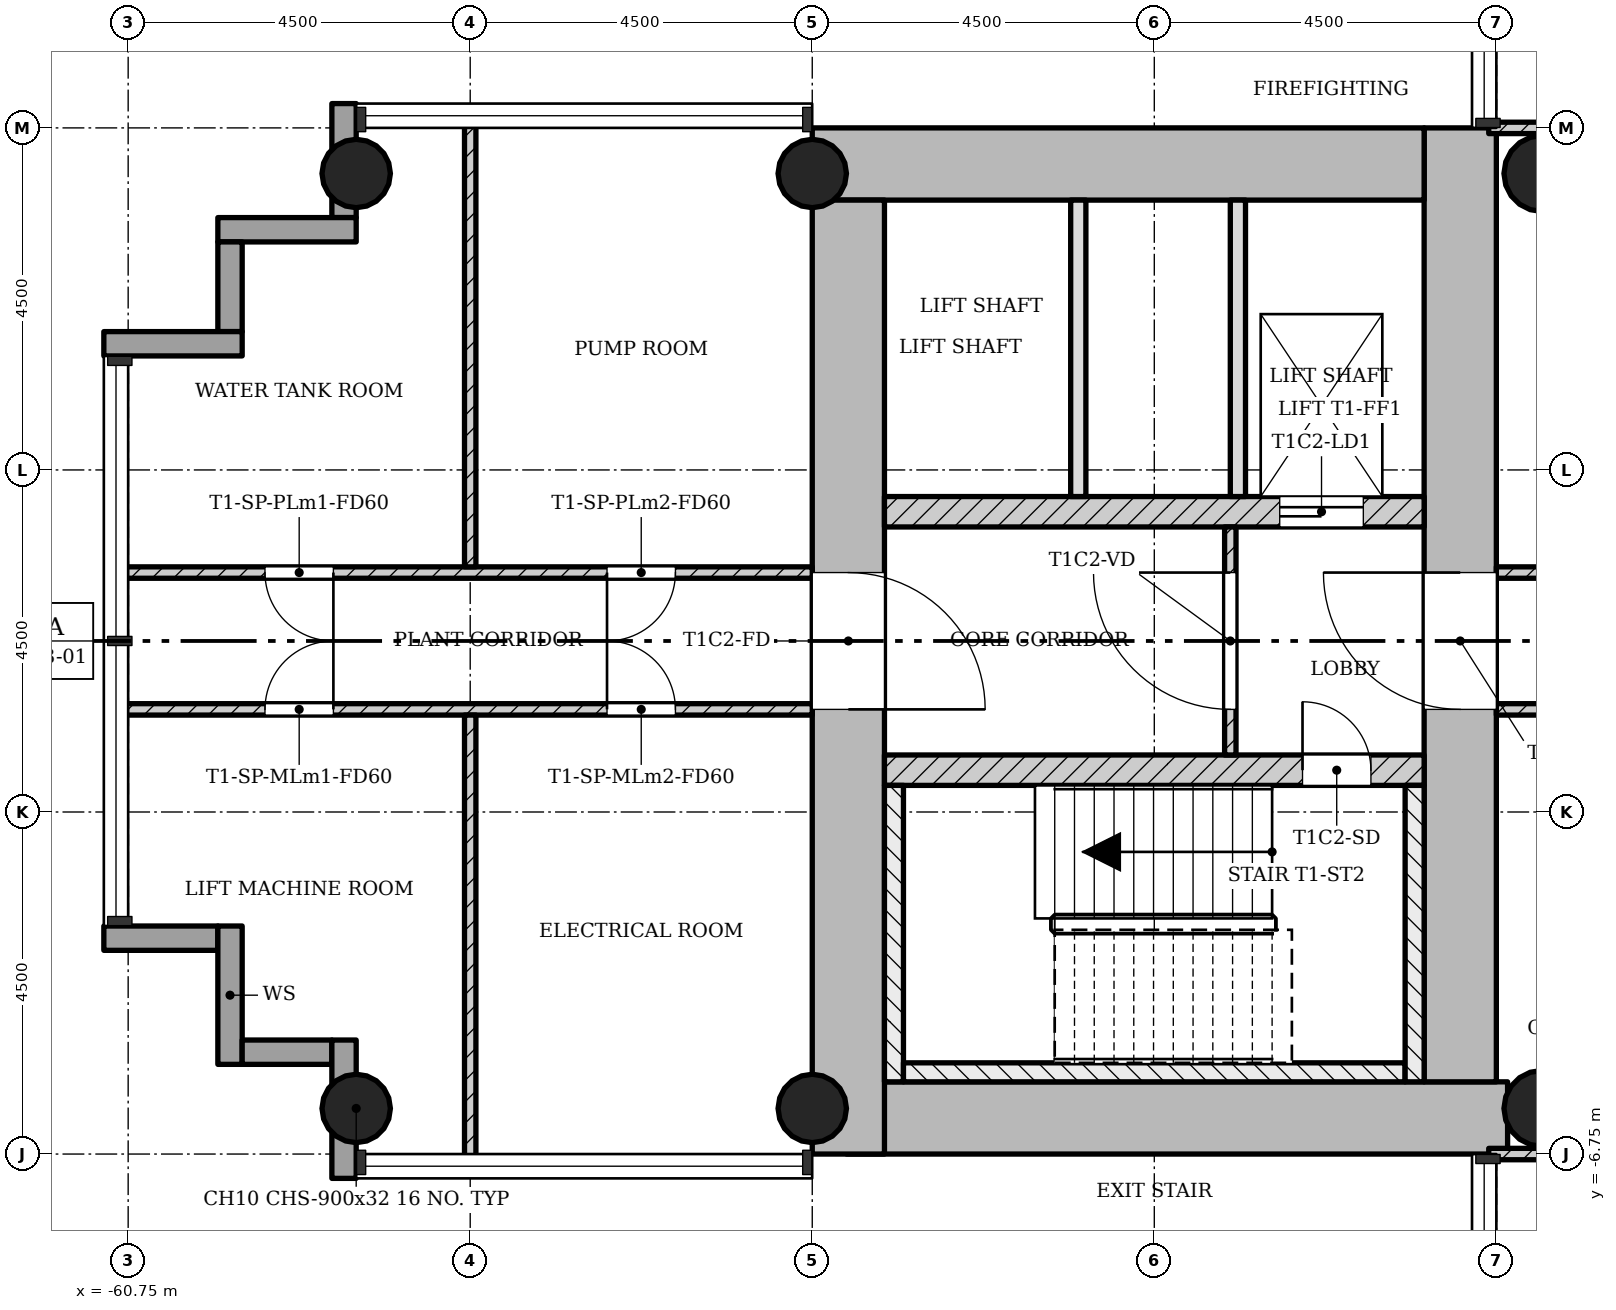
"""IFC4 building model, lengths in metres.
Left out: names, types, materials, properties, quantities, classifications, styles, units other than length and angle.
Written with IfcOpenShell. Run it as: python <this file> out.ifc"""

import sys

from ifc_helpers import new_model, si_unit, direction, frame, frame_2d, origin, origin_2d, place, context, subcontext, project, spatial, rectangle, hollow_circle, extrude, element, fill, save


model = new_model("IFC4")
c1 = context("Model", 3, precision=1e-05, world=origin(), true_north=direction((0.0, 1.0)))
c2 = subcontext(c1, "Body", "Model", "MODEL_VIEW")
j1 = project(units=[si_unit("LENGTHUNIT", "METRE"), si_unit("PLANEANGLEUNIT", "RADIAN")], contexts=[c1])
p1 = place(None, origin())
s1 = spatial("IfcSite", under=j1, at=p1, CompositionType="ELEMENT")
p2 = place(p1, origin())
s2 = spatial("IfcBuilding", under=s1, at=p2, CompositionType="ELEMENT")
p3 = place(p2, frame((0.0, 0.0, 124.2)))
s3 = spatial("IfcBuildingStorey", under=s2, at=p3, CompositionType="ELEMENT", Elevation=124.2)
p4 = place(p3, frame((-51.298, -6.275, 0.0), z_axis=(0.0, 0.0, 1.0), x_axis=(1.0, 0.0, 0.0)))
e1 = element("IfcWall", 1, at=p4, inside=s3, PredefinedType="SHEAR", context=c2, shape_type="SweptSolid", body=[
    extrude(rectangle(XDim=8.696, YDim=0.95, at=frame_2d((4.348, 0.0))), origin(), (0.0, 0.0, 1.0), 4.5),
])
p5 = place(p3, frame((-43.225, -5.8, 0.0), z_axis=(0.0, 0.0, 1.0), x_axis=(0.0, 1.0, 0.0)))
e2 = element("IfcWall", 2, at=p5, inside=s3, PredefinedType="SHEAR", context=c2, shape_type="SweptSolid", body=[
    extrude(rectangle(XDim=12.55, YDim=0.95, at=frame_2d((6.275, 0.0))), origin(), (0.0, 0.0, 1.0), 4.5),
])
p6 = place(p5, frame((4.9, 0.0, 0.0)))
e3 = element("IfcOpeningElement", 3, at=p6, cuts=e2, PredefinedType="OPENING", context=c2, shape_type="SweptSolid", body=[
    extrude(rectangle(XDim=1.8, YDim=2.1, at=frame_2d((0.9, 1.05))), frame((0.0, 0.485, 0.0), z_axis=(0.0, -1.0, 0.0), x_axis=(1.0, 0.0, 0.0)), (0.0, 0.0, 1.0), 0.97),
])
p7 = place(p3, frame((-43.7, 6.275, 0.0), z_axis=(0.0, 0.0, 1.0), x_axis=(-1.0, 0.0, 0.0)))
e4 = element("IfcWall", 4, at=p7, inside=s3, PredefinedType="SHEAR", context=c2, shape_type="SweptSolid", body=[
    extrude(rectangle(XDim=8.05, YDim=0.95, at=frame_2d((4.025, 0.0))), origin(), (0.0, 0.0, 1.0), 4.5),
])
p8 = place(p3, frame((-51.275, 5.8, 0.0), z_axis=(0.0, 0.0, 1.0), x_axis=(0.0, -1.0, 0.0)))
e5 = element("IfcWall", 5, at=p8, inside=s3, PredefinedType="SHEAR", context=c2, shape_type="SweptSolid", body=[
    extrude(rectangle(XDim=12.55, YDim=0.95, at=frame_2d((6.275, 0.0))), origin(), (0.0, 0.0, 1.0), 4.5),
])
p9 = place(p8, frame((4.9, 0.0, 0.0)))
e6 = element("IfcOpeningElement", 6, at=p9, cuts=e5, PredefinedType="OPENING", context=c2, shape_type="SweptSolid", body=[
    extrude(rectangle(XDim=1.8, YDim=2.1, at=frame_2d((0.9, 1.05))), frame((0.0, 0.485, 0.0), z_axis=(0.0, -1.0, 0.0), x_axis=(1.0, 0.0, 0.0)), (0.0, 0.0, 1.0), 0.97),
])
p10 = place(p3, frame((-50.8, -1.7, 0.0), z_axis=(0.0, 0.0, 1.0), x_axis=(1.0, 0.0, 0.0)))
e7 = element("IfcWall", 7, at=p10, inside=s3, PredefinedType="SHEAR", context=c2, shape_type="SweptSolid", body=[
    extrude(rectangle(XDim=7.1, YDim=0.4, at=frame_2d((3.55, 0.0))), origin(), (0.0, 0.0, 1.0), 4.5),
])
p11 = place(p10, frame((5.5, 0.0, 0.0)))
e8 = element("IfcOpeningElement", 8, at=p11, cuts=e7, PredefinedType="OPENING", context=c2, shape_type="SweptSolid", body=[
    extrude(rectangle(XDim=0.9, YDim=2.1, at=frame_2d((0.45, 1.05))), frame((0.0, 0.21, 0.0), z_axis=(0.0, -1.0, 0.0), x_axis=(1.0, 0.0, 0.0)), (0.0, 0.0, 1.0), 0.42),
])
p12 = place(p3, frame((-50.8, 1.7, 0.0), z_axis=(0.0, 0.0, 1.0), x_axis=(1.0, 0.0, 0.0)))
e9 = element("IfcWall", 9, at=p12, inside=s3, PredefinedType="SHEAR", context=c2, shape_type="SweptSolid", body=[
    extrude(rectangle(XDim=7.1, YDim=0.4, at=frame_2d((3.55, 0.0))), origin(), (0.0, 0.0, 1.0), 4.5),
])
p13 = place(p12, frame((5.2, 0.0, 0.0)))
e10 = element("IfcOpeningElement", 10, at=p13, cuts=e9, PredefinedType="OPENING", context=c2, shape_type="SweptSolid", body=[
    extrude(rectangle(XDim=1.1, YDim=2.1, at=frame_2d((0.55, 1.05))), frame((0.0, 0.21, 0.0), z_axis=(0.0, -1.0, 0.0), x_axis=(1.0, 0.0, 0.0)), (0.0, 0.0, 1.0), 0.42),
])
for number, where, z_axis, x_axis in (
    (11, (-51.75, -6.15, 0.0), (0.0, 0.0, 1.0), (1.0, 0.0, 0.0)),
    (12, (-51.75, 6.15, 0.0), (0.0, 0.0, 1.0), (1.0, 0.0, 0.0)),
    (13, (-57.75, -6.15, 0.0), (0.0, 0.0, 1.0), (1.0, 0.0, 0.0)),
    (14, (-57.75, 6.15, 0.0), (0.0, 0.0, 1.0), (1.0, 0.0, 0.0)),
):
    element("IfcColumn", number, at=place(p3, frame(where, z_axis=z_axis, x_axis=x_axis)), inside=s3, PredefinedType="COLUMN", context=c2, shape_type="SweptSolid", body=[
        extrude(hollow_circle(Radius=0.45, WallThickness=0.032, at=origin_2d()), origin(), (0.0, 0.0, 1.0), 4.5),
    ])
for number, where, z_axis, x_axis in (
    (15, (-42.15, -6.15, 0.0), (0.0, 0.0, 1.0), (1.0, 0.0, 0.0)),
    (16, (-42.15, 6.15, 0.0), (0.0, 0.0, 1.0), (1.0, 0.0, 0.0)),
):
    element("IfcColumn", number, at=place(p3, frame(where, z_axis=z_axis, x_axis=x_axis)), inside=s3, PredefinedType="COLUMN", context=c2, shape_type="SweptSolid", body=[
        extrude(hollow_circle(Radius=0.5, WallThickness=0.036, at=origin_2d()), origin(), (0.0, 0.0, 1.0), 4.5),
    ])
p14 = place(p3, frame((-61.07, -3.91, -0.3), z_axis=(0.0, 0.0, 1.0), x_axis=(1.0, 0.0, 0.0)))
e17 = element("IfcWall", 17, at=p14, inside=s3, PredefinedType="STANDARD", context=c2, shape_type="SweptSolid", body=[
    extrude(rectangle(XDim=1.5, YDim=0.32, at=frame_2d((0.75, 0.0))), origin(), (0.0, 0.0, 1.0), 4.5),
])
p15 = place(p3, frame((-59.41, -3.75, -0.3), z_axis=(0.0, 0.0, 1.0), x_axis=(0.0, -1.0, 0.0)))
e18 = element("IfcWall", 18, at=p15, inside=s3, PredefinedType="STANDARD", context=c2, shape_type="SweptSolid", body=[
    extrude(rectangle(XDim=1.82, YDim=0.32, at=frame_2d((0.91, 0.0))), origin(), (0.0, 0.0, 1.0), 4.5),
])
p16 = place(p3, frame((-59.25, -5.41, -0.3), z_axis=(0.0, 0.0, 1.0), x_axis=(1.0, 0.0, 0.0)))
e19 = element("IfcWall", 19, at=p16, inside=s3, PredefinedType="STANDARD", context=c2, shape_type="SweptSolid", body=[
    extrude(rectangle(XDim=1.18, YDim=0.32, at=frame_2d((0.59, 0.0))), origin(), (0.0, 0.0, 1.0), 4.5),
])
p17 = place(p3, frame((-57.91, -5.25, -0.3), z_axis=(0.0, 0.0, 1.0), x_axis=(0.0, -1.0, 0.0)))
e20 = element("IfcWall", 20, at=p17, inside=s3, PredefinedType="STANDARD", context=c2, shape_type="SweptSolid", body=[
    extrude(rectangle(XDim=1.82, YDim=0.32, at=frame_2d((0.91, 0.0))), origin(), (0.0, 0.0, 1.0), 4.5),
])
p18 = place(p3, frame((-57.91, 7.07, -0.3), z_axis=(0.0, 0.0, 1.0), x_axis=(0.0, -1.0, 0.0)))
e21 = element("IfcWall", 21, at=p18, inside=s3, PredefinedType="STANDARD", context=c2, shape_type="SweptSolid", body=[
    extrude(rectangle(XDim=1.5, YDim=0.32, at=frame_2d((0.75, 0.0))), origin(), (0.0, 0.0, 1.0), 4.5),
])
p19 = place(p3, frame((-57.75, 5.41, -0.3), z_axis=(0.0, 0.0, 1.0), x_axis=(-1.0, 0.0, 0.0)))
e22 = element("IfcWall", 22, at=p19, inside=s3, PredefinedType="STANDARD", context=c2, shape_type="SweptSolid", body=[
    extrude(rectangle(XDim=1.82, YDim=0.32, at=frame_2d((0.91, 0.0))), origin(), (0.0, 0.0, 1.0), 4.5),
])
p20 = place(p3, frame((-59.41, 5.25, -0.3), z_axis=(0.0, 0.0, 1.0), x_axis=(0.0, -1.0, 0.0)))
e23 = element("IfcWall", 23, at=p20, inside=s3, PredefinedType="STANDARD", context=c2, shape_type="SweptSolid", body=[
    extrude(rectangle(XDim=1.18, YDim=0.32, at=frame_2d((0.59, 0.0))), origin(), (0.0, 0.0, 1.0), 4.5),
])
p21 = place(p3, frame((-59.25, 3.91, -0.3), z_axis=(0.0, 0.0, 1.0), x_axis=(-1.0, 0.0, 0.0)))
e24 = element("IfcWall", 24, at=p21, inside=s3, PredefinedType="STANDARD", context=c2, shape_type="SweptSolid", body=[
    extrude(rectangle(XDim=1.82, YDim=0.32, at=frame_2d((0.91, 0.0))), origin(), (0.0, 0.0, 1.0), 4.5),
])
p22 = place(p3, frame((-46.25, 1.5, 0.0), z_axis=(0.0, 0.0, 1.0), x_axis=(0.0, -1.0, 0.0)))
e25 = element("IfcWall", 25, at=p22, inside=s3, PredefinedType="PARTITIONING", context=c2, shape_type="SweptSolid", body=[
    extrude(rectangle(XDim=3.0, YDim=0.15, at=frame_2d((1.5, 0.0))), origin(), (0.0, 0.0, 1.0), 4.1),
])
p23 = place(p22, frame((0.6, 0.0, 0.0)))
e26 = element("IfcOpeningElement", 26, at=p23, cuts=e25, PredefinedType="OPENING", context=c2, shape_type="SweptSolid", body=[
    extrude(rectangle(XDim=1.8, YDim=2.1, at=frame_2d((0.9, 1.05))), frame((0.0, 0.085, 0.0), z_axis=(0.0, -1.0, 0.0), x_axis=(1.0, 0.0, 0.0)), (0.0, 0.0, 1.0), 0.17),
])
for number, where, z_axis, x_axis in (
    (27, (-46.15, 5.8, 0.0), (0.0, 0.0, 1.0), (0.0, -1.0, 0.0)),
    (28, (-48.25, 5.8, 0.0), (0.0, 0.0, 1.0), (0.0, -1.0, 0.0)),
):
    element("IfcWall", number, at=place(p3, frame(where, z_axis=z_axis, x_axis=x_axis)), inside=s3, PredefinedType="SOLIDWALL", context=c2, shape_type="SweptSolid", body=[
        extrude(rectangle(XDim=3.9, YDim=0.2, at=frame_2d((1.95, 0.0))), origin(), (0.0, 0.0, 1.0), 4.1),
    ])
p24 = place(p3, frame((-42.75, 0.9, 0.0), z_axis=(0.0, 0.0, 1.0), x_axis=(1.0, 0.0, 0.0)))
e29 = element("IfcWall", 29, at=p24, inside=s3, PredefinedType="PARTITIONING", context=c2, shape_type="SweptSolid", body=[
    extrude(rectangle(XDim=5.85, YDim=0.15, at=frame_2d((2.925, 0.0))), origin(), (0.0, 0.0, 1.0), 4.1),
])
p25 = place(p24, frame((2.475, 0.0, 0.0)))
e30 = element("IfcOpeningElement", 30, at=p25, cuts=e29, PredefinedType="OPENING", context=c2, shape_type="SweptSolid", body=[
    extrude(rectangle(XDim=0.9, YDim=2.1, at=frame_2d((0.45, 1.05))), frame((0.0, 0.085, 0.0), z_axis=(0.0, -1.0, 0.0), x_axis=(1.0, 0.0, 0.0)), (0.0, 0.0, 1.0), 0.17),
])
p26 = place(p3, frame((-42.75, -0.9, 0.0), z_axis=(0.0, 0.0, 1.0), x_axis=(1.0, 0.0, 0.0)))
e31 = element("IfcWall", 31, at=p26, inside=s3, PredefinedType="PARTITIONING", context=c2, shape_type="SweptSolid", body=[
    extrude(rectangle(XDim=5.85, YDim=0.15, at=frame_2d((2.925, 0.0))), origin(), (0.0, 0.0, 1.0), 4.1),
])
p27 = place(p26, frame((2.475, 0.0, 0.0)))
e32 = element("IfcOpeningElement", 32, at=p27, cuts=e31, PredefinedType="OPENING", context=c2, shape_type="SweptSolid", body=[
    extrude(rectangle(XDim=0.9, YDim=2.1, at=frame_2d((0.45, 1.05))), frame((0.0, 0.085, 0.0), z_axis=(0.0, -1.0, 0.0), x_axis=(1.0, 0.0, 0.0)), (0.0, 0.0, 1.0), 0.17),
])
p28 = place(p3, frame((-60.85, 0.9, 0.0), z_axis=(0.0, 0.0, 1.0), x_axis=(1.0, 0.0, 0.0)))
e33 = element("IfcWall", 33, at=p28, inside=s3, PredefinedType="PARTITIONING", context=c2, shape_type="SweptSolid", body=[
    extrude(rectangle(XDim=9.1, YDim=0.15, at=frame_2d((4.55, 0.0))), origin(), (0.0, 0.0, 1.0), 4.1),
])
p29 = place(p28, frame((1.9, 0.0, 0.0)))
e34 = element("IfcOpeningElement", 34, at=p29, cuts=e33, PredefinedType="OPENING", context=c2, shape_type="SweptSolid", body=[
    extrude(rectangle(XDim=0.9, YDim=2.1, at=frame_2d((0.45, 1.05))), frame((0.0, 0.085, 0.0), z_axis=(0.0, -1.0, 0.0), x_axis=(1.0, 0.0, 0.0)), (0.0, 0.0, 1.0), 0.17),
])
p30 = place(p28, frame((6.4, 0.0, 0.0)))
e35 = element("IfcOpeningElement", 35, at=p30, cuts=e33, PredefinedType="OPENING", context=c2, shape_type="SweptSolid", body=[
    extrude(rectangle(XDim=0.9, YDim=2.1, at=frame_2d((0.45, 1.05))), frame((0.0, 0.085, 0.0), z_axis=(0.0, -1.0, 0.0), x_axis=(1.0, 0.0, 0.0)), (0.0, 0.0, 1.0), 0.17),
])
p31 = place(p3, frame((-56.25, 0.975, 0.0), z_axis=(0.0, 0.0, 1.0), x_axis=(0.0, 1.0, 0.0)))
e36 = element("IfcWall", 36, at=p31, inside=s3, PredefinedType="PARTITIONING", context=c2, shape_type="SweptSolid", body=[
    extrude(rectangle(XDim=5.875, YDim=0.15, at=frame_2d((2.938, 0.0))), origin(), (0.0, 0.0, 1.0), 4.1),
])
p32 = place(p3, frame((-60.85, -0.9, 0.0), z_axis=(0.0, 0.0, 1.0), x_axis=(1.0, 0.0, 0.0)))
e37 = element("IfcWall", 37, at=p32, inside=s3, PredefinedType="PARTITIONING", context=c2, shape_type="SweptSolid", body=[
    extrude(rectangle(XDim=9.1, YDim=0.15, at=frame_2d((4.55, 0.0))), origin(), (0.0, 0.0, 1.0), 4.1),
])
p33 = place(p32, frame((1.9, 0.0, 0.0)))
e38 = element("IfcOpeningElement", 38, at=p33, cuts=e37, PredefinedType="OPENING", context=c2, shape_type="SweptSolid", body=[
    extrude(rectangle(XDim=0.9, YDim=2.1, at=frame_2d((0.45, 1.05))), frame((0.0, 0.085, 0.0), z_axis=(0.0, -1.0, 0.0), x_axis=(1.0, 0.0, 0.0)), (0.0, 0.0, 1.0), 0.17),
])
p34 = place(p32, frame((6.4, 0.0, 0.0)))
e39 = element("IfcOpeningElement", 39, at=p34, cuts=e37, PredefinedType="OPENING", context=c2, shape_type="SweptSolid", body=[
    extrude(rectangle(XDim=0.9, YDim=2.1, at=frame_2d((0.45, 1.05))), frame((0.0, 0.085, 0.0), z_axis=(0.0, -1.0, 0.0), x_axis=(1.0, 0.0, 0.0)), (0.0, 0.0, 1.0), 0.17),
])
p35 = place(p3, frame((-56.25, -0.975, 0.0), z_axis=(0.0, 0.0, 1.0), x_axis=(0.0, -1.0, 0.0)))
e40 = element("IfcWall", 40, at=p35, inside=s3, PredefinedType="PARTITIONING", context=c2, shape_type="SweptSolid", body=[
    extrude(rectangle(XDim=5.875, YDim=0.15, at=frame_2d((2.938, 0.0))), origin(), (0.0, 0.0, 1.0), 4.1),
])
p36 = place(p3, frame((-42.85, 6.75, 0.0), z_axis=(0.0, 0.0, 1.0), x_axis=(1.0, 0.0, 0.0)))
e41 = element("IfcWall", 41, at=p36, inside=s3, PredefinedType="PARTITIONING", context=c2, shape_type="SweptSolid", body=[
    extrude(rectangle(XDim=13.7, YDim=0.15, at=frame_2d((6.85, 0.0))), origin(), (0.0, 0.0, 1.0), 4.1),
])
p37 = place(p36, frame((5.95, 0.0, 0.0)))
e42 = element("IfcOpeningElement", 42, at=p37, cuts=e41, PredefinedType="OPENING", context=c2, shape_type="SweptSolid", body=[
    extrude(rectangle(XDim=1.8, YDim=2.1, at=frame_2d((0.9, 1.05))), frame((0.0, 0.085, 0.0), z_axis=(0.0, -1.0, 0.0), x_axis=(1.0, 0.0, 0.0)), (0.0, 0.0, 1.0), 0.17),
])
p38 = place(p3, frame((-42.85, -6.75, 0.0), z_axis=(0.0, 0.0, 1.0), x_axis=(1.0, 0.0, 0.0)))
e43 = element("IfcWall", 43, at=p38, inside=s3, PredefinedType="PARTITIONING", context=c2, shape_type="SweptSolid", body=[
    extrude(rectangle(XDim=13.7, YDim=0.15, at=frame_2d((6.85, 0.0))), origin(), (0.0, 0.0, 1.0), 4.1),
])
p39 = place(p38, frame((5.95, 0.0, 0.0)))
e44 = element("IfcOpeningElement", 44, at=p39, cuts=e43, PredefinedType="OPENING", context=c2, shape_type="SweptSolid", body=[
    extrude(rectangle(XDim=1.8, YDim=2.1, at=frame_2d((0.9, 1.05))), frame((0.0, 0.085, 0.0), z_axis=(0.0, -1.0, 0.0), x_axis=(1.0, 0.0, 0.0)), (0.0, 0.0, 1.0), 0.17),
])
p40 = place(p3, frame((-50.675, -1.9, 0.0), z_axis=(0.0, 0.0, 1.0), x_axis=(0.0, -1.0, 0.0)))
e45 = element("IfcWall", 45, at=p40, inside=s3, PredefinedType="SHEAR", context=c2, shape_type="SweptSolid", body=[
    extrude(rectangle(XDim=3.9, YDim=0.25, at=frame_2d((1.95, 0.0))), origin(), (0.0, 0.0, 1.0), 4.5),
])
p41 = place(p3, frame((-43.95, -5.675, 0.0), z_axis=(0.0, 0.0, 1.0), x_axis=(-1.0, 0.0, 0.0)))
e46 = element("IfcWall", 46, at=p41, inside=s3, PredefinedType="SHEAR", context=c2, shape_type="SweptSolid", body=[
    extrude(rectangle(XDim=6.6, YDim=0.25, at=frame_2d((3.3, 0.0))), origin(), (0.0, 0.0, 1.0), 4.5),
])
p42 = place(p3, frame((-43.825, -1.9, 0.0), z_axis=(0.0, 0.0, 1.0), x_axis=(0.0, -1.0, 0.0)))
e47 = element("IfcWall", 47, at=p42, inside=s3, PredefinedType="SHEAR", context=c2, shape_type="SweptSolid", body=[
    extrude(rectangle(XDim=3.9, YDim=0.25, at=frame_2d((1.95, 0.0))), origin(), (0.0, 0.0, 1.0), 4.5),
])
p43 = place(p23, origin())
e48 = element("IfcDoor", 48, at=p43, inside=s3, OperationType="SINGLE_SWING_LEFT", PredefinedType="DOOR", context=c2, shape_type="SweptSolid", body=[
    extrude(rectangle(XDim=1.8, YDim=2.1, at=frame_2d((0.9, 1.05))), frame((0.0, 0.025, 0.0), z_axis=(0.0, -1.0, 0.0), x_axis=(1.0, 0.0, 0.0)), (0.0, 0.0, 1.0), 0.05),
])
fill(e26, e48)
p44 = place(p29, origin())
e49 = element("IfcDoor", 49, at=p44, inside=s3, OperationType="SINGLE_SWING_RIGHT", PredefinedType="DOOR", context=c2, shape_type="SweptSolid", body=[
    extrude(rectangle(XDim=0.9, YDim=2.1, at=frame_2d((0.45, 1.05))), frame((0.0, 0.025, 0.0), z_axis=(0.0, -1.0, 0.0), x_axis=(1.0, 0.0, 0.0)), (0.0, 0.0, 1.0), 0.05),
])
fill(e34, e49)
p45 = place(p30, origin())
e50 = element("IfcDoor", 50, at=p45, inside=s3, OperationType="SINGLE_SWING_LEFT", PredefinedType="DOOR", context=c2, shape_type="SweptSolid", body=[
    extrude(rectangle(XDim=0.9, YDim=2.1, at=frame_2d((0.45, 1.05))), frame((0.0, 0.025, 0.0), z_axis=(0.0, -1.0, 0.0), x_axis=(1.0, 0.0, 0.0)), (0.0, 0.0, 1.0), 0.05),
])
fill(e35, e50)
p46 = place(p33, origin())
e51 = element("IfcDoor", 51, at=p46, inside=s3, OperationType="SINGLE_SWING_LEFT", PredefinedType="DOOR", context=c2, shape_type="SweptSolid", body=[
    extrude(rectangle(XDim=0.9, YDim=2.1, at=frame_2d((0.45, 1.05))), frame((0.0, 0.025, 0.0), z_axis=(0.0, -1.0, 0.0), x_axis=(1.0, 0.0, 0.0)), (0.0, 0.0, 1.0), 0.05),
])
fill(e38, e51)
p47 = place(p34, origin())
e52 = element("IfcDoor", 52, at=p47, inside=s3, OperationType="SINGLE_SWING_RIGHT", PredefinedType="DOOR", context=c2, shape_type="SweptSolid", body=[
    extrude(rectangle(XDim=0.9, YDim=2.1, at=frame_2d((0.45, 1.05))), frame((0.0, 0.025, 0.0), z_axis=(0.0, -1.0, 0.0), x_axis=(1.0, 0.0, 0.0)), (0.0, 0.0, 1.0), 0.05),
])
fill(e39, e52)
p48 = place(p11, origin())
e53 = element("IfcDoor", 53, at=p48, inside=s3, OperationType="SINGLE_SWING_RIGHT", PredefinedType="DOOR", context=c2, shape_type="SweptSolid", body=[
    extrude(rectangle(XDim=0.9, YDim=2.1, at=frame_2d((0.45, 1.05))), frame((0.0, 0.025, 0.0), z_axis=(0.0, -1.0, 0.0), x_axis=(1.0, 0.0, 0.0)), (0.0, 0.0, 1.0), 0.05),
])
fill(e8, e53)
p49 = place(p13, origin())
e54 = element("IfcDoor", 54, at=p49, inside=s3, OperationType="SLIDING_TO_LEFT", PredefinedType="DOOR", context=c2, shape_type="SweptSolid", body=[
    extrude(rectangle(XDim=1.1, YDim=2.1, at=frame_2d((0.55, 1.05))), frame((0.0, 0.025, 0.0), z_axis=(0.0, -1.0, 0.0), x_axis=(1.0, 0.0, 0.0)), (0.0, 0.0, 1.0), 0.05),
])
fill(e10, e54)
p50 = place(p6, origin())
e55 = element("IfcDoor", 55, at=p50, inside=s3, OperationType="SINGLE_SWING_LEFT", PredefinedType="DOOR", context=c2, shape_type="SweptSolid", body=[
    extrude(rectangle(XDim=1.8, YDim=2.1, at=frame_2d((0.9, 1.05))), frame((0.0, 0.025, 0.0), z_axis=(0.0, -1.0, 0.0), x_axis=(1.0, 0.0, 0.0)), (0.0, 0.0, 1.0), 0.05),
])
fill(e3, e55)
p51 = place(p9, origin())
e56 = element("IfcDoor", 56, at=p51, inside=s3, OperationType="SINGLE_SWING_LEFT", PredefinedType="DOOR", context=c2, shape_type="SweptSolid", body=[
    extrude(rectangle(XDim=1.8, YDim=2.1, at=frame_2d((0.9, 1.05))), frame((0.0, 0.025, 0.0), z_axis=(0.0, -1.0, 0.0), x_axis=(1.0, 0.0, 0.0)), (0.0, 0.0, 1.0), 0.05),
])
fill(e6, e56)
save(model, sys.argv[1])
